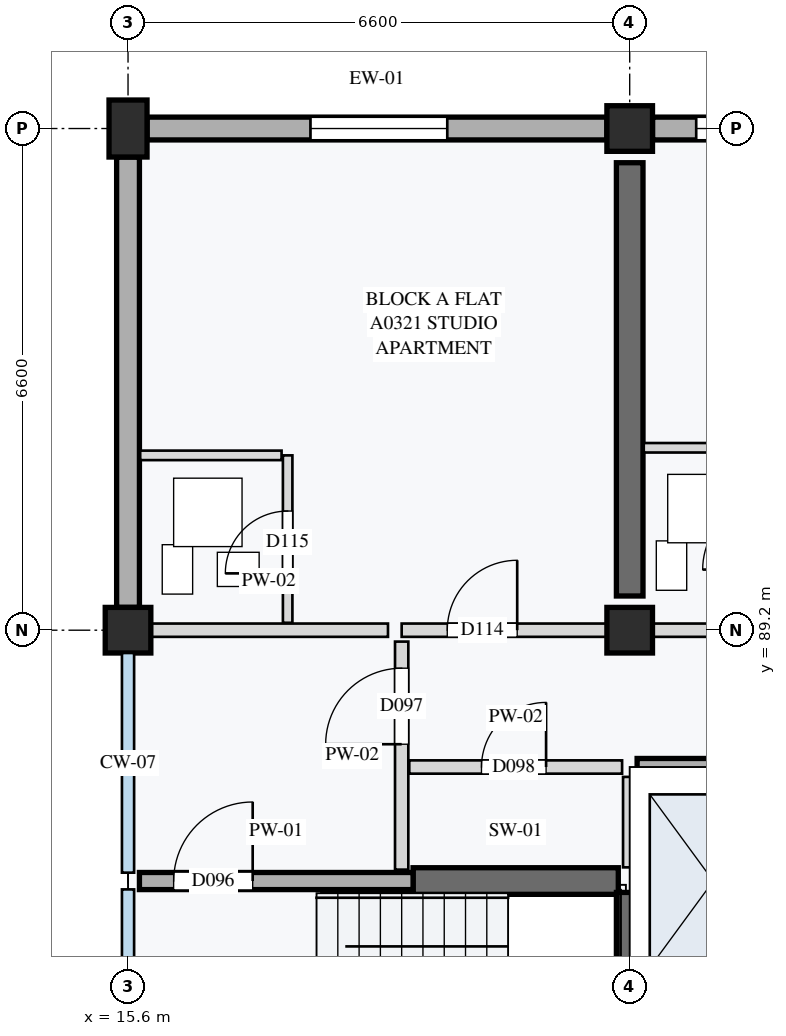
"""IFC4 building model, lengths in metres.
Left out: names, types, materials, properties, quantities, classifications, styles, units other than length and angle.
Written with IfcOpenShell. Run it as: python <this file> out.ifc"""

import sys

from ifc_helpers import new_model, si_unit, direction, frame, frame_2d, origin, origin_2d, place, context, subcontext, project, spatial, rectangle, extrude, element, fill, save


model = new_model("IFC4")
c1 = context("Model", 3, precision=1e-05, world=origin(), true_north=direction((0.0, 1.0)))
c2 = subcontext(c1, "Body", "Model", "MODEL_VIEW")
j1 = project(units=[si_unit("LENGTHUNIT", "METRE"), si_unit("PLANEANGLEUNIT", "RADIAN")], contexts=[c1])
p1 = place(None, origin())
s1 = spatial("IfcSite", under=j1, at=p1, CompositionType="ELEMENT")
p2 = place(p1, origin())
s2 = spatial("IfcBuilding", under=s1, at=p2, CompositionType="ELEMENT")
p3 = place(p2, frame((0.0, 0.0, 11.6)))
s3 = spatial("IfcBuildingStorey", under=s2, at=p3, CompositionType="ELEMENT", Elevation=11.6)
p4 = place(p3, frame((15.6, 89.2, 0.0), z_axis=(0.0, 0.0, 1.0), x_axis=(1.0, 0.0, 0.0)))
e1 = element("IfcColumn", 1, at=p4, inside=s3, PredefinedType="COLUMN", context=c2, shape_type="SweptSolid", body=[
    extrude(rectangle(XDim=0.6, YDim=0.6, at=origin_2d()), origin(), (0.0, 0.0, 1.0), 3.2),
])
p5 = place(p3, frame((15.6, 95.8, 0.0), z_axis=(0.0, 0.0, 1.0), x_axis=(1.0, 0.0, 0.0)))
e2 = element("IfcColumn", 2, at=p5, inside=s3, PredefinedType="COLUMN", context=c2, shape_type="SweptSolid", body=[
    extrude(rectangle(XDim=0.5, YDim=0.75, at=origin_2d()), origin(), (0.0, 0.0, 1.0), 3.2),
])
for number, where, z_axis, x_axis in (
    (3, (22.2, 89.2, 0.0), (0.0, 0.0, 1.0), (1.0, 0.0, 0.0)),
    (4, (22.2, 95.8, 0.0), (0.0, 0.0, 1.0), (1.0, 0.0, 0.0)),
):
    element("IfcColumn", number, at=place(p3, frame(where, z_axis=z_axis, x_axis=x_axis)), inside=s3, PredefinedType="COLUMN", context=c2, shape_type="SweptSolid", body=[
        extrude(rectangle(XDim=0.6, YDim=0.6, at=origin_2d()), origin(), (0.0, 0.0, 1.0), 3.2),
    ])
p6 = place(p3, frame((19.35, 85.9, 0.0), z_axis=(0.0, 0.0, 1.0), x_axis=(1.0, 0.0, 0.0)))
e5 = element("IfcWall", 5, at=p6, inside=s3, PredefinedType="SHEAR", context=c2, shape_type="SweptSolid", body=[
    extrude(rectangle(XDim=2.7, YDim=0.35, at=frame_2d((1.35, 0.0))), origin(), (0.0, 0.0, 1.0), 2.96),
])
p7 = place(p3, frame((22.2, 82.95, 0.0), z_axis=(0.0, 0.0, 1.0), x_axis=(0.0, 1.0, 0.0)))
e6 = element("IfcWall", 6, at=p7, inside=s3, PredefinedType="SHEAR", context=c2, shape_type="SweptSolid", body=[
    extrude(rectangle(XDim=2.8, YDim=0.35, at=frame_2d((1.4, 0.0))), origin(), (0.0, 0.0, 1.0), 2.96),
])
p8 = place(p3, frame((22.2, 89.65, 0.0), z_axis=(0.0, 0.0, 1.0), x_axis=(0.0, 1.0, 0.0)))
e7 = element("IfcWall", 7, at=p8, inside=s3, PredefinedType="SHEAR", context=c2, shape_type="SweptSolid", body=[
    extrude(rectangle(XDim=5.7, YDim=0.35, at=frame_2d((2.85, 0.0))), origin(), (0.0, 0.0, 1.0), 2.96),
])
p9 = place(p3, frame((15.85, 95.8, 0.0), z_axis=(0.0, 0.0, 1.0), x_axis=(1.0, 0.0, 0.0)))
e8 = element("IfcWall", 8, at=p9, inside=s3, PredefinedType="STANDARD", context=c2, shape_type="SweptSolid", body=[
    extrude(rectangle(XDim=6.05, YDim=0.3, at=frame_2d((3.025, 0.0))), origin(), (0.0, 0.0, 1.0), 2.6),
])
p10 = place(p9, frame((2.15, 0.0, 0.85)))
e9 = element("IfcOpeningElement", 9, at=p10, cuts=e8, PredefinedType="OPENING", context=c2, shape_type="SweptSolid", body=[
    extrude(rectangle(XDim=1.8, YDim=1.35, at=frame_2d((0.9, 0.675))), frame((0.0, 0.16, 0.0), z_axis=(0.0, -1.0, 0.0), x_axis=(1.0, 0.0, 0.0)), (0.0, 0.0, 1.0), 0.32),
])
p11 = place(p3, frame((22.5, 95.8, 0.0), z_axis=(0.0, 0.0, 1.0), x_axis=(1.0, 0.0, 0.0)))
e10 = element("IfcWall", 10, at=p11, inside=s3, PredefinedType="STANDARD", context=c2, shape_type="SweptSolid", body=[
    extrude(rectangle(XDim=6.0, YDim=0.3, at=frame_2d((3.0, 0.0))), origin(), (0.0, 0.0, 1.0), 2.6),
])
p12 = place(p11, frame((0.575, 0.0, 0.85)))
e11 = element("IfcOpeningElement", 11, at=p12, cuts=e10, PredefinedType="OPENING", context=c2, shape_type="SweptSolid", body=[
    extrude(rectangle(XDim=1.8, YDim=1.35, at=frame_2d((0.9, 0.675))), frame((0.0, 0.16, 0.0), z_axis=(0.0, -1.0, 0.0), x_axis=(1.0, 0.0, 0.0)), (0.0, 0.0, 1.0), 0.32),
])
p13 = place(p11, frame((4.0, 0.0, 0.85)))
e12 = element("IfcOpeningElement", 12, at=p13, cuts=e10, PredefinedType="OPENING", context=c2, shape_type="SweptSolid", body=[
    extrude(rectangle(XDim=1.5, YDim=1.35, at=frame_2d((0.75, 0.675))), frame((0.0, 0.16, 0.0), z_axis=(0.0, -1.0, 0.0), x_axis=(1.0, 0.0, 0.0)), (0.0, 0.0, 1.0), 0.32),
])
p14 = place(p3, frame((15.6, 89.5, 0.0), z_axis=(0.0, 0.0, 1.0), x_axis=(0.0, 1.0, 0.0)))
e13 = element("IfcWall", 13, at=p14, inside=s3, PredefinedType="STANDARD", context=c2, shape_type="SweptSolid", body=[
    extrude(rectangle(XDim=5.925, YDim=0.3, at=frame_2d((2.962, 0.0))), origin(), (0.0, 0.0, 1.0), 2.65),
])
p15 = place(p3, frame((15.75, 85.9, 0.0), z_axis=(0.0, 0.0, 1.0), x_axis=(1.0, 0.0, 0.0)))
e14 = element("IfcWall", 14, at=p15, inside=s3, PredefinedType="STANDARD", context=c2, shape_type="SweptSolid", body=[
    extrude(rectangle(XDim=3.6, YDim=0.225, at=frame_2d((1.8, 0.0))), origin(), (0.0, 0.0, 1.0), 2.96),
])
p16 = place(p15, frame((0.45, 0.0, 0.0)))
e15 = element("IfcOpeningElement", 15, at=p16, cuts=e14, PredefinedType="OPENING", context=c2, shape_type="SweptSolid", body=[
    extrude(rectangle(XDim=1.04, YDim=2.12, at=frame_2d((0.52, 1.06))), frame((0.0, 0.123, 0.0), z_axis=(0.0, -1.0, 0.0), x_axis=(1.0, 0.0, 0.0)), (0.0, 0.0, 1.0), 0.245),
])
p17 = place(p3, frame((19.2, 86.05, 0.0), z_axis=(0.0, 0.0, 1.0), x_axis=(0.0, 1.0, 0.0)))
e16 = element("IfcWall", 16, at=p17, inside=s3, PredefinedType="PARTITIONING", context=c2, shape_type="SweptSolid", body=[
    extrude(rectangle(XDim=3.0, YDim=0.175, at=frame_2d((1.5, 0.0))), origin(), (0.0, 0.0, 1.0), 2.96),
])
p18 = place(p17, frame((1.65, 0.0, 0.0)))
e17 = element("IfcOpeningElement", 17, at=p18, cuts=e16, PredefinedType="OPENING", context=c2, shape_type="SweptSolid", body=[
    extrude(rectangle(XDim=1.0, YDim=2.1, at=frame_2d((0.5, 1.05))), frame((0.0, 0.097, 0.0), z_axis=(0.0, -1.0, 0.0), x_axis=(1.0, 0.0, 0.0)), (0.0, 0.0, 1.0), 0.195),
])
p19 = place(p3, frame((19.3, 87.4, 0.0), z_axis=(0.0, 0.0, 1.0), x_axis=(1.0, 0.0, 0.0)))
e18 = element("IfcWall", 18, at=p19, inside=s3, PredefinedType="PARTITIONING", context=c2, shape_type="SweptSolid", body=[
    extrude(rectangle(XDim=2.8, YDim=0.175, at=frame_2d((1.4, 0.0))), origin(), (0.0, 0.0, 1.0), 2.96),
])
p20 = place(p19, frame((0.95, 0.0, 0.0)))
e19 = element("IfcOpeningElement", 19, at=p20, cuts=e18, PredefinedType="OPENING", context=c2, shape_type="SweptSolid", body=[
    extrude(rectangle(XDim=0.85, YDim=2.0, at=frame_2d((0.425, 1.0))), frame((0.0, 0.097, 0.0), z_axis=(0.0, -1.0, 0.0), x_axis=(1.0, 0.0, 0.0)), (0.0, 0.0, 1.0), 0.195),
])
p21 = place(p3, frame((22.2, 86.08, 0.0), z_axis=(0.0, 0.0, 1.0), x_axis=(0.0, 1.0, 0.0)))
e20 = element("IfcWall", 20, at=p21, inside=s3, PredefinedType="PARTITIONING", context=c2, shape_type="SweptSolid", body=[
    extrude(rectangle(XDim=1.19, YDim=0.175, at=frame_2d((0.595, 0.0))), origin(), (0.0, 0.0, 1.0), 2.96),
])
p22 = place(p3, frame((22.298, 87.4, 0.0), z_axis=(0.0, 0.0, 1.0), x_axis=(1.0, 0.0, 0.0)))
e21 = element("IfcWall", 21, at=p22, inside=s3, PredefinedType="STANDARD", context=c2, shape_type="SweptSolid", body=[
    extrude(rectangle(XDim=4.022, YDim=0.225, at=frame_2d((2.011, 0.0))), origin(), (0.0, 0.0, 1.0), 2.96),
])
p23 = place(p3, frame((15.88, 89.2, 0.0), z_axis=(0.0, 0.0, 1.0), x_axis=(1.0, 0.0, 0.0)))
e22 = element("IfcWall", 22, at=p23, inside=s3, PredefinedType="PARTITIONING", context=c2, shape_type="SweptSolid", body=[
    extrude(rectangle(XDim=3.14, YDim=0.175, at=frame_2d((1.57, 0.0))), origin(), (0.0, 0.0, 1.0), 2.55),
])
p24 = place(p3, frame((19.2, 89.2, 0.0), z_axis=(0.0, 0.0, 1.0), x_axis=(1.0, 0.0, 0.0)))
e23 = element("IfcWall", 23, at=p24, inside=s3, PredefinedType="PARTITIONING", context=c2, shape_type="SweptSolid", body=[
    extrude(rectangle(XDim=3.0, YDim=0.175, at=frame_2d((1.5, 0.0))), origin(), (0.0, 0.0, 1.0), 2.55),
])
p25 = place(p24, frame((0.6, 0.0, 0.0)))
e24 = element("IfcOpeningElement", 24, at=p25, cuts=e23, PredefinedType="OPENING", context=c2, shape_type="SweptSolid", body=[
    extrude(rectangle(XDim=0.92, YDim=2.14, at=frame_2d((0.46, 1.07))), frame((0.0, 0.097, 0.0), z_axis=(0.0, -1.0, 0.0), x_axis=(1.0, 0.0, 0.0)), (0.0, 0.0, 1.0), 0.195),
])
p26 = place(p3, frame((17.7, 89.298, 0.0), z_axis=(0.0, 0.0, 1.0), x_axis=(0.0, 1.0, 0.0)))
e25 = element("IfcWall", 25, at=p26, inside=s3, PredefinedType="PARTITIONING", context=c2, shape_type="SweptSolid", body=[
    extrude(rectangle(XDim=2.202, YDim=0.125, at=frame_2d((1.101, 0.0))), origin(), (0.0, 0.0, 1.0), 2.96),
])
p27 = place(p26, frame((0.65, 0.0, 0.0)))
e26 = element("IfcOpeningElement", 26, at=p27, cuts=e25, PredefinedType="OPENING", context=c2, shape_type="SweptSolid", body=[
    extrude(rectangle(XDim=0.82, YDim=2.05, at=frame_2d((0.41, 1.025))), frame((0.0, 0.073, 0.0), z_axis=(0.0, -1.0, 0.0), x_axis=(1.0, 0.0, 0.0)), (0.0, 0.0, 1.0), 0.145),
])
p28 = place(p3, frame((15.76, 91.5, 0.0), z_axis=(0.0, 0.0, 1.0), x_axis=(1.0, 0.0, 0.0)))
e27 = element("IfcWall", 27, at=p28, inside=s3, PredefinedType="PARTITIONING", context=c2, shape_type="SweptSolid", body=[
    extrude(rectangle(XDim=1.86, YDim=0.125, at=frame_2d((0.93, 0.0))), origin(), (0.0, 0.0, 1.0), 2.96),
])
p29 = place(p3, frame((22.2, 89.2, 0.0), z_axis=(0.0, 0.0, 1.0), x_axis=(1.0, 0.0, 0.0)))
e28 = element("IfcWall", 28, at=p29, inside=s3, PredefinedType="PARTITIONING", context=c2, shape_type="SweptSolid", body=[
    extrude(rectangle(XDim=6.6, YDim=0.175, at=frame_2d((3.3, 0.0))), origin(), (0.0, 0.0, 1.0), 2.55),
])
p30 = place(p29, frame((3.85, 0.0, 0.0)))
e29 = element("IfcOpeningElement", 29, at=p30, cuts=e28, PredefinedType="OPENING", context=c2, shape_type="SweptSolid", body=[
    extrude(rectangle(XDim=0.95, YDim=2.1, at=frame_2d((0.475, 1.05))), frame((0.0, 0.097, 0.0), z_axis=(0.0, -1.0, 0.0), x_axis=(1.0, 0.0, 0.0)), (0.0, 0.0, 1.0), 0.195),
])
p31 = place(p3, frame((22.385, 91.6, 0.0), z_axis=(0.0, 0.0, 1.0), x_axis=(1.0, 0.0, 0.0)))
e30 = element("IfcWall", 30, at=p31, inside=s3, PredefinedType="PARTITIONING", context=c2, shape_type="SweptSolid", body=[
    extrude(rectangle(XDim=1.635, YDim=0.125, at=frame_2d((0.817, 0.0))), origin(), (0.0, 0.0, 1.0), 2.96),
])
p32 = place(p10, origin())
e31 = element("IfcWindow", 31, at=p32, inside=s3, PartitioningType="SINGLE_PANEL", PredefinedType="WINDOW", context=c2, shape_type="SweptSolid", body=[
    extrude(rectangle(XDim=1.8, YDim=1.35, at=frame_2d((0.9, 0.675))), frame((0.0, 0.03, 0.0), z_axis=(0.0, -1.0, 0.0), x_axis=(1.0, 0.0, 0.0)), (0.0, 0.0, 1.0), 0.06),
])
fill(e9, e31)
p33 = place(p12, origin())
e32 = element("IfcWindow", 32, at=p33, inside=s3, PartitioningType="SINGLE_PANEL", PredefinedType="WINDOW", context=c2, shape_type="SweptSolid", body=[
    extrude(rectangle(XDim=1.8, YDim=1.35, at=frame_2d((0.9, 0.675))), frame((0.0, 0.03, 0.0), z_axis=(0.0, -1.0, 0.0), x_axis=(1.0, 0.0, 0.0)), (0.0, 0.0, 1.0), 0.06),
])
fill(e11, e32)
p34 = place(p16, origin())
e33 = element("IfcDoor", 33, at=p34, inside=s3, OperationType="SINGLE_SWING_RIGHT", PredefinedType="DOOR", context=c2, shape_type="SweptSolid", body=[
    extrude(rectangle(XDim=1.04, YDim=2.12, at=frame_2d((0.52, 1.06))), frame((0.0, 0.025, 0.0), z_axis=(0.0, -1.0, 0.0), x_axis=(1.0, 0.0, 0.0)), (0.0, 0.0, 1.0), 0.05),
])
fill(e15, e33)
p35 = place(p18, origin())
e34 = element("IfcDoor", 34, at=p35, inside=s3, OperationType="SINGLE_SWING_LEFT", PredefinedType="DOOR", context=c2, shape_type="SweptSolid", body=[
    extrude(rectangle(XDim=1.0, YDim=2.1, at=frame_2d((0.5, 1.05))), frame((0.0, 0.025, 0.0), z_axis=(0.0, -1.0, 0.0), x_axis=(1.0, 0.0, 0.0)), (0.0, 0.0, 1.0), 0.05),
])
fill(e17, e34)
p36 = place(p20, origin())
e35 = element("IfcDoor", 35, at=p36, inside=s3, OperationType="SINGLE_SWING_RIGHT", PredefinedType="DOOR", context=c2, shape_type="SweptSolid", body=[
    extrude(rectangle(XDim=0.85, YDim=2.0, at=frame_2d((0.425, 1.0))), frame((0.0, 0.025, 0.0), z_axis=(0.0, -1.0, 0.0), x_axis=(1.0, 0.0, 0.0)), (0.0, 0.0, 1.0), 0.05),
])
fill(e19, e35)
p37 = place(p25, origin())
e36 = element("IfcDoor", 36, at=p37, inside=s3, OperationType="SINGLE_SWING_RIGHT", PredefinedType="DOOR", context=c2, shape_type="SweptSolid", body=[
    extrude(rectangle(XDim=0.92, YDim=2.14, at=frame_2d((0.46, 1.07))), frame((0.0, 0.025, 0.0), z_axis=(0.0, -1.0, 0.0), x_axis=(1.0, 0.0, 0.0)), (0.0, 0.0, 1.0), 0.05),
])
fill(e24, e36)
p38 = place(p27, origin())
e37 = element("IfcDoor", 37, at=p38, inside=s3, OperationType="SINGLE_SWING_LEFT", PredefinedType="DOOR", context=c2, shape_type="SweptSolid", body=[
    extrude(rectangle(XDim=0.82, YDim=2.05, at=frame_2d((0.41, 1.025))), frame((0.0, 0.025, 0.0), z_axis=(0.0, -1.0, 0.0), x_axis=(1.0, 0.0, 0.0)), (0.0, 0.0, 1.0), 0.05),
])
fill(e26, e37)
save(model, sys.argv[1])
